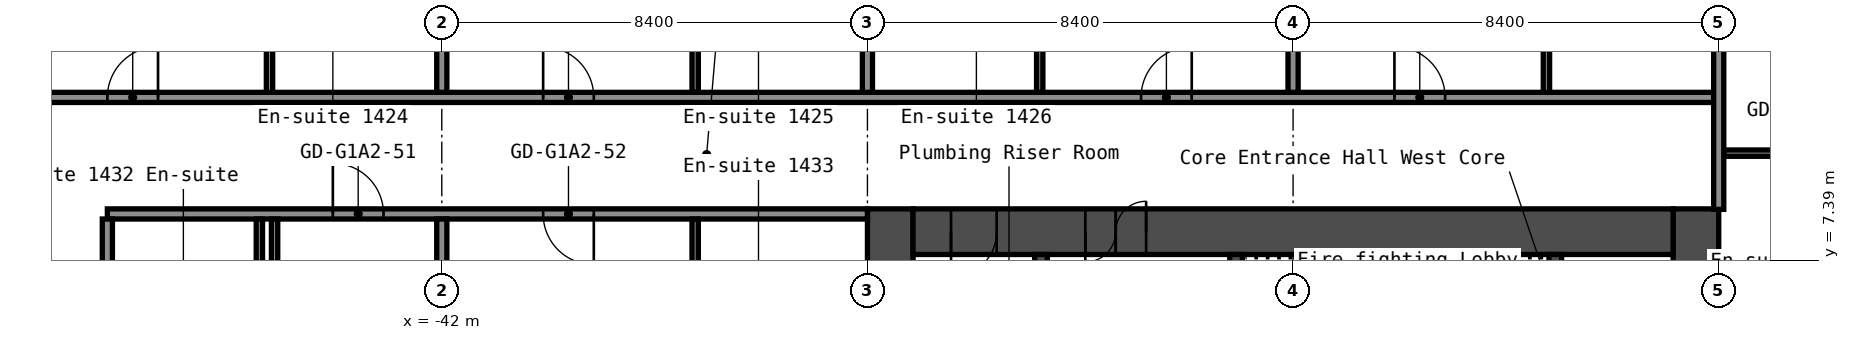
"""IFC4 building model, lengths in metres.
Left out: names, types, materials, properties, quantities, classifications, styles, units other than length and angle.
Written with IfcOpenShell. Run it as: python <this file> out.ifc"""

import sys

from ifc_helpers import new_model, si_unit, direction, frame, frame_2d, origin, place, context, subcontext, project, spatial, rectangle, extrude, element, fill, save


model = new_model("IFC4")
c1 = context("Model", 3, precision=1e-05, world=origin(), true_north=direction((0.0, 1.0)))
c2 = subcontext(c1, "Body", "Model", "MODEL_VIEW")
j1 = project(units=[si_unit("LENGTHUNIT", "METRE"), si_unit("PLANEANGLEUNIT", "RADIAN")], contexts=[c1])
p1 = place(None, origin())
s1 = spatial("IfcSite", under=j1, at=p1, CompositionType="ELEMENT")
p2 = place(p1, origin())
s2 = spatial("IfcBuilding", under=s1, at=p2, CompositionType="ELEMENT")
p3 = place(p2, frame((0.0, 0.0, 51.8)))
s3 = spatial("IfcBuildingStorey", under=s2, at=p3, CompositionType="ELEMENT", Elevation=51.8)
p4 = place(p3, frame((-17.25, -8.4, 0.0), z_axis=(0.0, 0.0, 1.0), x_axis=(0.0, 1.0, 0.0)))
e1 = element("IfcWall", 1, at=p4, inside=s3, PredefinedType="SHEAR", context=c2, shape_type="SweptSolid", body=[
    extrude(rectangle(XDim=16.8, YDim=0.9, at=frame_2d((8.4, 0.0))), origin(), (0.0, 0.0, 1.0), 2.8),
])
p5 = place(p4, frame((12.75, 0.0, 0.0)))
e2 = element("IfcOpeningElement", 2, at=p5, cuts=e1, PredefinedType="OPENING", context=c2, shape_type="SweptSolid", body=[
    extrude(rectangle(XDim=1.2, YDim=2.1, at=frame_2d((0.6, 1.05))), frame((0.0, 0.46, 0.0), z_axis=(0.0, -1.0, 0.0), x_axis=(1.0, 0.0, 0.0)), (0.0, 0.0, 1.0), 0.92),
])
p6 = place(p4, frame((2.85, 0.0, 0.0)))
e3 = element("IfcOpeningElement", 3, at=p6, cuts=e1, PredefinedType="OPENING", context=c2, shape_type="SweptSolid", body=[
    extrude(rectangle(XDim=1.2, YDim=2.1, at=frame_2d((0.6, 1.05))), frame((0.0, 0.46, 0.0), z_axis=(0.0, -1.0, 0.0), x_axis=(1.0, 0.0, 0.0)), (0.0, 0.0, 1.0), 0.92),
])
p7 = place(p3, frame((-33.15, -8.4, 0.0), z_axis=(0.0, 0.0, 1.0), x_axis=(0.0, 1.0, 0.0)))
e4 = element("IfcWall", 4, at=p7, inside=s3, PredefinedType="SHEAR", context=c2, shape_type="SweptSolid", body=[
    extrude(rectangle(XDim=16.8, YDim=0.9, at=frame_2d((8.4, 0.0))), origin(), (0.0, 0.0, 1.0), 2.8),
])
p8 = place(p3, frame((-32.7, 7.95, 0.0), z_axis=(0.0, 0.0, 1.0), x_axis=(1.0, 0.0, 0.0)))
e5 = element("IfcWall", 5, at=p8, inside=s3, PredefinedType="SHEAR", context=c2, shape_type="SweptSolid", body=[
    extrude(rectangle(XDim=15.0, YDim=0.9, at=frame_2d((7.5, 0.0))), origin(), (0.0, 0.0, 1.0), 2.8),
])
p9 = place(p8, frame((3.4, 0.0, 0.0)))
e6 = element("IfcOpeningElement", 6, at=p9, cuts=e5, PredefinedType="OPENING", context=c2, shape_type="SweptSolid", body=[
    extrude(rectangle(XDim=1.2, YDim=2.1, at=frame_2d((0.6, 1.05))), frame((0.0, 0.46, 0.0), z_axis=(0.0, -1.0, 0.0), x_axis=(1.0, 0.0, 0.0)), (0.0, 0.0, 1.0), 0.92),
])
p10 = place(p8, frame((0.75, 0.0, 0.0)))
e7 = element("IfcOpeningElement", 7, at=p10, cuts=e5, PredefinedType="OPENING", context=c2, shape_type="SweptSolid", body=[
    extrude(rectangle(XDim=0.9, YDim=2.1, at=frame_2d((0.45, 1.05))), frame((0.0, 0.46, 0.0), z_axis=(0.0, -1.0, 0.0), x_axis=(1.0, 0.0, 0.0)), (0.0, 0.0, 1.0), 0.92),
])
p11 = place(p3, frame((-20.025, 1.2, 0.0), z_axis=(0.0, 0.0, 1.0), x_axis=(0.0, 1.0, 0.0)))
e8 = element("IfcWall", 8, at=p11, inside=s3, PredefinedType="SHEAR", context=c2, shape_type="SweptSolid", body=[
    extrude(rectangle(XDim=6.3, YDim=0.25, at=frame_2d((3.15, 0.0))), origin(), (0.0, 0.0, 1.0), 2.8),
])
p12 = place(p3, frame((-26.325, 3.75, 0.0), z_axis=(0.0, 0.0, 1.0), x_axis=(0.0, 1.0, 0.0)))
e9 = element("IfcWall", 9, at=p12, inside=s3, PredefinedType="SHEAR", context=c2, shape_type="SweptSolid", body=[
    extrude(rectangle(XDim=3.75, YDim=0.25, at=frame_2d((1.875, 0.0))), origin(), (0.0, 0.0, 1.0), 2.8),
])
p13 = place(p12, frame((1.25, 0.0, 0.0)))
e10 = element("IfcOpeningElement", 10, at=p13, cuts=e9, PredefinedType="OPENING", context=c2, shape_type="SweptSolid", body=[
    extrude(rectangle(XDim=1.2, YDim=2.1, at=frame_2d((0.6, 1.05))), frame((0.0, 0.135, 0.0), z_axis=(0.0, -1.0, 0.0), x_axis=(1.0, 0.0, 0.0)), (0.0, 0.0, 1.0), 0.27),
])
p14 = place(p3, frame((-30.175, 1.45, 0.0), z_axis=(0.0, 0.0, 1.0), x_axis=(0.0, 1.0, 0.0)))
e11 = element("IfcWall", 11, at=p14, inside=s3, PredefinedType="SHEAR", context=c2, shape_type="SweptSolid", body=[
    extrude(rectangle(XDim=6.05, YDim=0.25, at=frame_2d((3.025, 0.0))), origin(), (0.0, 0.0, 1.0), 2.8),
])
p15 = place(p14, frame((2.625, 0.0, 0.0)))
e12 = element("IfcOpeningElement", 12, at=p15, cuts=e11, PredefinedType="OPENING", context=c2, shape_type="SweptSolid", body=[
    extrude(rectangle(XDim=1.1, YDim=2.1, at=frame_2d((0.55, 1.05))), frame((0.0, 0.135, 0.0), z_axis=(0.0, -1.0, 0.0), x_axis=(1.0, 0.0, 0.0)), (0.0, 0.0, 1.0), 0.27),
])
p16 = place(p3, frame((-48.6, 8.3, 0.0), z_axis=(0.0, 0.0, 1.0), x_axis=(1.0, 0.0, 0.0)))
e13 = element("IfcWall", 13, at=p16, inside=s3, PredefinedType="PARTITIONING", context=c2, shape_type="SweptSolid", body=[
    extrude(rectangle(XDim=15.0, YDim=0.2, at=frame_2d((7.5, 0.0))), origin(), (0.0, 0.0, 1.0), 2.8),
])
p17 = place(p16, frame((4.45, 0.0, 0.0)))
e14 = element("IfcOpeningElement", 14, at=p17, cuts=e13, PredefinedType="OPENING", context=c2, shape_type="SweptSolid", body=[
    extrude(rectangle(XDim=1.0, YDim=2.1, at=frame_2d((0.5, 1.05))), frame((0.0, 0.11, 0.0), z_axis=(0.0, -1.0, 0.0), x_axis=(1.0, 0.0, 0.0)), (0.0, 0.0, 1.0), 0.22),
])
p18 = place(p16, frame((8.6, 0.0, 0.0)))
e15 = element("IfcOpeningElement", 15, at=p18, cuts=e13, PredefinedType="OPENING", context=c2, shape_type="SweptSolid", body=[
    extrude(rectangle(XDim=1.0, YDim=2.1, at=frame_2d((0.5, 1.05))), frame((0.0, 0.11, 0.0), z_axis=(0.0, -1.0, 0.0), x_axis=(1.0, 0.0, 0.0)), (0.0, 0.0, 1.0), 0.22),
])
p19 = place(p3, frame((-16.7, 9.5, 0.0), z_axis=(0.0, 0.0, 1.0), x_axis=(1.0, 0.0, 0.0)))
e16 = element("IfcWall", 16, at=p19, inside=s3, PredefinedType="PARTITIONING", context=c2, shape_type="SweptSolid", body=[
    extrude(rectangle(XDim=3.238, YDim=0.125, at=frame_2d((1.619, 0.0))), origin(), (0.0, 0.0, 1.0), 2.8),
])
p20 = place(p19, frame((1.2, 0.0, 0.0)))
e17 = element("IfcOpeningElement", 17, at=p20, cuts=e16, PredefinedType="OPENING", context=c2, shape_type="SweptSolid", body=[
    extrude(rectangle(XDim=0.8, YDim=2.1, at=frame_2d((0.4, 1.05))), frame((0.0, 0.073, 0.0), z_axis=(0.0, -1.0, 0.0), x_axis=(1.0, 0.0, 0.0)), (0.0, 0.0, 1.0), 0.145),
])
p21 = place(p3, frame((-51.1, 10.6, 0.0), z_axis=(0.0, 0.0, 1.0), x_axis=(1.0, 0.0, 0.0)))
e18 = element("IfcWall", 18, at=p21, inside=s3, PredefinedType="PARTITIONING", context=c2, shape_type="SweptSolid", body=[
    extrude(rectangle(XDim=34.3, YDim=0.2, at=frame_2d((17.15, 0.0))), origin(), (0.0, 0.0, 1.0), 2.8),
])
p22 = place(p21, frame((2.5, 0.0, 0.0)))
e19 = element("IfcOpeningElement", 19, at=p22, cuts=e18, PredefinedType="OPENING", context=c2, shape_type="SweptSolid", body=[
    extrude(rectangle(XDim=1.0, YDim=2.1, at=frame_2d((0.5, 1.05))), frame((0.0, 0.11, 0.0), z_axis=(0.0, -1.0, 0.0), x_axis=(1.0, 0.0, 0.0)), (0.0, 0.0, 1.0), 0.22),
])
p23 = place(p21, frame((11.1, 0.0, 0.0)))
e20 = element("IfcOpeningElement", 20, at=p23, cuts=e18, PredefinedType="OPENING", context=c2, shape_type="SweptSolid", body=[
    extrude(rectangle(XDim=1.0, YDim=2.1, at=frame_2d((0.5, 1.05))), frame((0.0, 0.11, 0.0), z_axis=(0.0, -1.0, 0.0), x_axis=(1.0, 0.0, 0.0)), (0.0, 0.0, 1.0), 0.22),
])
p24 = place(p21, frame((22.9, 0.0, 0.0)))
e21 = element("IfcOpeningElement", 21, at=p24, cuts=e18, PredefinedType="OPENING", context=c2, shape_type="SweptSolid", body=[
    extrude(rectangle(XDim=1.0, YDim=2.1, at=frame_2d((0.5, 1.05))), frame((0.0, 0.11, 0.0), z_axis=(0.0, -1.0, 0.0), x_axis=(1.0, 0.0, 0.0)), (0.0, 0.0, 1.0), 0.22),
])
p25 = place(p21, frame((27.9, 0.0, 0.0)))
e22 = element("IfcOpeningElement", 22, at=p25, cuts=e18, PredefinedType="OPENING", context=c2, shape_type="SweptSolid", body=[
    extrude(rectangle(XDim=1.0, YDim=2.1, at=frame_2d((0.5, 1.05))), frame((0.0, 0.11, 0.0), z_axis=(0.0, -1.0, 0.0), x_axis=(1.0, 0.0, 0.0)), (0.0, 0.0, 1.0), 0.22),
])
p26 = place(p3, frame((-48.6, -8.2, 0.0), z_axis=(0.0, 0.0, 1.0), x_axis=(0.0, 1.0, 0.0)))
e23 = element("IfcWall", 23, at=p26, inside=s3, PredefinedType="PARTITIONING", context=c2, shape_type="SweptSolid", body=[
    extrude(rectangle(XDim=16.4, YDim=0.2, at=frame_2d((8.2, 0.0))), origin(), (0.0, 0.0, 1.0), 2.8),
])
p27 = place(p3, frame((-45.6, 5.1, 0.0), z_axis=(0.0, 0.0, 1.0), x_axis=(0.0, 1.0, 0.0)))
e24 = element("IfcWall", 24, at=p27, inside=s3, PredefinedType="PARTITIONING", context=c2, shape_type="SweptSolid", body=[
    extrude(rectangle(XDim=3.1, YDim=0.125, at=frame_2d((1.55, 0.0))), origin(), (0.0, 0.0, 1.0), 2.8),
])
p28 = place(p3, frame((-45.4, 10.7, 0.0), z_axis=(0.0, 0.0, 1.0), x_axis=(0.0, 1.0, 0.0)))
e25 = element("IfcWall", 25, at=p28, inside=s3, PredefinedType="PARTITIONING", context=c2, shape_type="SweptSolid", body=[
    extrude(rectangle(XDim=3.3, YDim=0.125, at=frame_2d((1.65, 0.0))), origin(), (0.0, 0.0, 1.0), 2.8),
])
p29 = place(p3, frame((-45.3, -8.2, 0.0), z_axis=(0.0, 0.0, 1.0), x_axis=(0.0, 1.0, 0.0)))
e26 = element("IfcWall", 26, at=p29, inside=s3, PredefinedType="PARTITIONING", context=c2, shape_type="SweptSolid", body=[
    extrude(rectangle(XDim=16.4, YDim=0.125, at=frame_2d((8.2, 0.0))), origin(), (0.0, 0.0, 1.0), 2.8),
])
p30 = place(p29, frame((4.05, 0.0, 0.0)))
e27 = element("IfcOpeningElement", 27, at=p30, cuts=e26, PredefinedType="OPENING", context=c2, shape_type="SweptSolid", body=[
    extrude(rectangle(XDim=0.9, YDim=2.1, at=frame_2d((0.45, 1.05))), frame((0.0, 0.073, 0.0), z_axis=(0.0, -1.0, 0.0), x_axis=(1.0, 0.0, 0.0)), (0.0, 0.0, 1.0), 0.145),
])
p31 = place(p29, frame((11.45, 0.0, 0.0)))
e28 = element("IfcOpeningElement", 28, at=p31, cuts=e26, PredefinedType="OPENING", context=c2, shape_type="SweptSolid", body=[
    extrude(rectangle(XDim=0.9, YDim=2.1, at=frame_2d((0.45, 1.05))), frame((0.0, 0.073, 0.0), z_axis=(0.0, -1.0, 0.0), x_axis=(1.0, 0.0, 0.0)), (0.0, 0.0, 1.0), 0.145),
])
p32 = place(p3, frame((-42.0, -8.2, 0.0), z_axis=(0.0, 0.0, 1.0), x_axis=(0.0, 1.0, 0.0)))
e29 = element("IfcWall", 29, at=p32, inside=s3, PredefinedType="PARTITIONING", context=c2, shape_type="SweptSolid", body=[
    extrude(rectangle(XDim=16.4, YDim=0.2, at=frame_2d((8.2, 0.0))), origin(), (0.0, 0.0, 1.0), 2.8),
])
p33 = place(p3, frame((-42.0, 10.7, 0.0), z_axis=(0.0, 0.0, 1.0), x_axis=(0.0, 1.0, 0.0)))
e30 = element("IfcWall", 30, at=p33, inside=s3, PredefinedType="PARTITIONING", context=c2, shape_type="SweptSolid", body=[
    extrude(rectangle(XDim=9.6, YDim=0.2, at=frame_2d((4.8, 0.0))), origin(), (0.0, 0.0, 1.0), 2.8),
])
for number, where, z_axis, x_axis in (
    (31, (-37.0, 4.9, 0.0), (0.0, 0.0, 1.0), (0.0, 1.0, 0.0)),
    (32, (-37.0, 10.7, 0.0), (0.0, 0.0, 1.0), (0.0, 1.0, 0.0)),
):
    element("IfcWall", number, at=place(p3, frame(where, z_axis=z_axis, x_axis=x_axis)), inside=s3, PredefinedType="PARTITIONING", context=c2, shape_type="SweptSolid", body=[
        extrude(rectangle(XDim=3.3, YDim=0.125, at=frame_2d((1.65, 0.0))), origin(), (0.0, 0.0, 1.0), 2.8),
    ])
p34 = place(p3, frame((-33.6, 10.7, 0.0), z_axis=(0.0, 0.0, 1.0), x_axis=(0.0, 1.0, 0.0)))
e33 = element("IfcWall", 33, at=p34, inside=s3, PredefinedType="PARTITIONING", context=c2, shape_type="SweptSolid", body=[
    extrude(rectangle(XDim=9.6, YDim=0.2, at=frame_2d((4.8, 0.0))), origin(), (0.0, 0.0, 1.0), 2.8),
])
p35 = place(p3, frame((-30.2, 10.7, 0.0), z_axis=(0.0, 0.0, 1.0), x_axis=(0.0, 1.0, 0.0)))
e34 = element("IfcWall", 34, at=p35, inside=s3, PredefinedType="PARTITIONING", context=c2, shape_type="SweptSolid", body=[
    extrude(rectangle(XDim=3.3, YDim=0.125, at=frame_2d((1.65, 0.0))), origin(), (0.0, 0.0, 1.0), 2.8),
])
p36 = place(p3, frame((-25.2, 10.7, 0.0), z_axis=(0.0, 0.0, 1.0), x_axis=(0.0, 1.0, 0.0)))
e35 = element("IfcWall", 35, at=p36, inside=s3, PredefinedType="PARTITIONING", context=c2, shape_type="SweptSolid", body=[
    extrude(rectangle(XDim=9.6, YDim=0.2, at=frame_2d((4.8, 0.0))), origin(), (0.0, 0.0, 1.0), 2.8),
])
p37 = place(p3, frame((-20.2, 10.7, 0.0), z_axis=(0.0, 0.0, 1.0), x_axis=(0.0, 1.0, 0.0)))
e36 = element("IfcWall", 36, at=p37, inside=s3, PredefinedType="PARTITIONING", context=c2, shape_type="SweptSolid", body=[
    extrude(rectangle(XDim=3.3, YDim=0.125, at=frame_2d((1.65, 0.0))), origin(), (0.0, 0.0, 1.0), 2.8),
])
p38 = place(p3, frame((-16.8, 8.39, 0.0), z_axis=(0.0, 0.0, 1.0), x_axis=(0.0, 1.0, 0.0)))
e37 = element("IfcWall", 37, at=p38, inside=s3, PredefinedType="PARTITIONING", context=c2, shape_type="SweptSolid", body=[
    extrude(rectangle(XDim=11.91, YDim=0.2, at=frame_2d((5.955, 0.0))), origin(), (0.0, 0.0, 1.0), 2.8),
])
p39 = place(p9, origin())
e38 = element("IfcDoor", 38, at=p39, inside=s3, OperationType="DOUBLE_DOOR_SINGLE_SWING", PredefinedType="DOOR", context=c2, shape_type="SweptSolid", body=[
    extrude(rectangle(XDim=1.2, YDim=2.1, at=frame_2d((0.6, 1.05))), frame((0.0, 0.025, 0.0), z_axis=(0.0, -1.0, 0.0), x_axis=(1.0, 0.0, 0.0)), (0.0, 0.0, 1.0), 0.05),
])
fill(e6, e38)
p40 = place(p10, origin())
e39 = element("IfcDoor", 39, at=p40, inside=s3, OperationType="SINGLE_SWING_LEFT", PredefinedType="DOOR", context=c2, shape_type="SweptSolid", body=[
    extrude(rectangle(XDim=0.9, YDim=2.1, at=frame_2d((0.45, 1.05))), frame((0.0, 0.025, 0.0), z_axis=(0.0, -1.0, 0.0), x_axis=(1.0, 0.0, 0.0)), (0.0, 0.0, 1.0), 0.05),
])
fill(e7, e39)
p41 = place(p17, origin())
e40 = element("IfcDoor", 40, at=p41, inside=s3, OperationType="SINGLE_SWING_RIGHT", PredefinedType="DOOR", context=c2, shape_type="SweptSolid", body=[
    extrude(rectangle(XDim=1.0, YDim=2.1, at=frame_2d((0.5, 1.05))), frame((0.0, 0.025, 0.0), z_axis=(0.0, -1.0, 0.0), x_axis=(1.0, 0.0, 0.0)), (0.0, 0.0, 1.0), 0.05),
])
fill(e14, e40)
p42 = place(p18, origin())
e41 = element("IfcDoor", 41, at=p42, inside=s3, OperationType="SINGLE_SWING_RIGHT", PredefinedType="DOOR", context=c2, shape_type="SweptSolid", body=[
    extrude(rectangle(XDim=1.0, YDim=2.1, at=frame_2d((0.5, 1.05))), frame((0.0, 0.025, 0.0), z_axis=(0.0, -1.0, 0.0), x_axis=(1.0, 0.0, 0.0)), (0.0, 0.0, 1.0), 0.05),
])
fill(e15, e41)
p43 = place(p22, origin())
e42 = element("IfcDoor", 42, at=p43, inside=s3, OperationType="SINGLE_SWING_LEFT", PredefinedType="DOOR", context=c2, shape_type="SweptSolid", body=[
    extrude(rectangle(XDim=1.0, YDim=2.1, at=frame_2d((0.5, 1.05))), frame((0.0, 0.025, 0.0), z_axis=(0.0, -1.0, 0.0), x_axis=(1.0, 0.0, 0.0)), (0.0, 0.0, 1.0), 0.05),
])
fill(e19, e42)
p44 = place(p23, origin())
e43 = element("IfcDoor", 43, at=p44, inside=s3, OperationType="SINGLE_SWING_RIGHT", PredefinedType="DOOR", context=c2, shape_type="SweptSolid", body=[
    extrude(rectangle(XDim=1.0, YDim=2.1, at=frame_2d((0.5, 1.05))), frame((0.0, 0.025, 0.0), z_axis=(0.0, -1.0, 0.0), x_axis=(1.0, 0.0, 0.0)), (0.0, 0.0, 1.0), 0.05),
])
fill(e20, e43)
p45 = place(p24, origin())
e44 = element("IfcDoor", 44, at=p45, inside=s3, OperationType="SINGLE_SWING_LEFT", PredefinedType="DOOR", context=c2, shape_type="SweptSolid", body=[
    extrude(rectangle(XDim=1.0, YDim=2.1, at=frame_2d((0.5, 1.05))), frame((0.0, 0.025, 0.0), z_axis=(0.0, -1.0, 0.0), x_axis=(1.0, 0.0, 0.0)), (0.0, 0.0, 1.0), 0.05),
])
fill(e21, e44)
p46 = place(p25, origin())
e45 = element("IfcDoor", 45, at=p46, inside=s3, OperationType="SINGLE_SWING_RIGHT", PredefinedType="DOOR", context=c2, shape_type="SweptSolid", body=[
    extrude(rectangle(XDim=1.0, YDim=2.1, at=frame_2d((0.5, 1.05))), frame((0.0, 0.025, 0.0), z_axis=(0.0, -1.0, 0.0), x_axis=(1.0, 0.0, 0.0)), (0.0, 0.0, 1.0), 0.05),
])
fill(e22, e45)
save(model, sys.argv[1])
